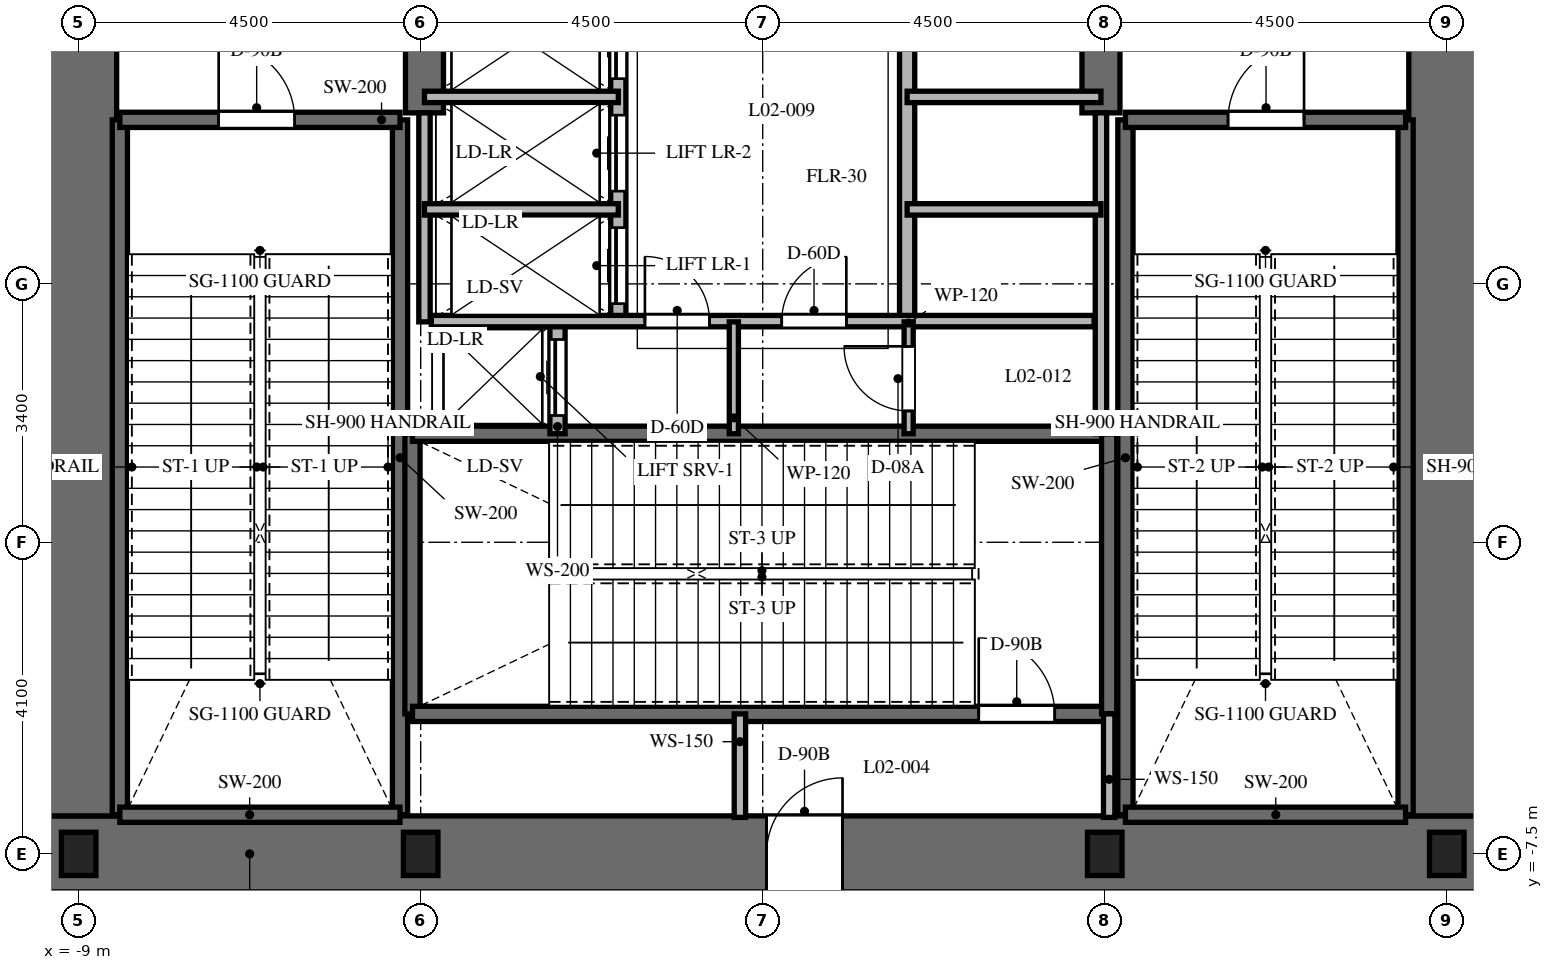
"""IFC4 building model, lengths in metres.
Left out: names, types, materials, properties, quantities, classifications, styles, units other than length and angle.
Written with IfcOpenShell. Run it as: python <this file> out.ifc"""

import sys

from ifc_helpers import new_model, si_unit, direction, frame, frame_2d, origin, origin_2d, place, context, subcontext, project, spatial, rectangle, i_section, extrude, element, fill, save


model = new_model("IFC4")
c1 = context("Model", 3, precision=1e-05, world=origin(), true_north=direction((0.0, 1.0)))
c2 = subcontext(c1, "Body", "Model", "MODEL_VIEW")
j1 = project(units=[si_unit("LENGTHUNIT", "METRE"), si_unit("PLANEANGLEUNIT", "RADIAN")], contexts=[c1])
p1 = place(None, origin())
s1 = spatial("IfcSite", under=j1, at=p1, CompositionType="ELEMENT")
p2 = place(p1, origin())
s2 = spatial("IfcBuilding", under=s1, at=p2, CompositionType="ELEMENT")
p3 = place(p2, frame((0.0, 0.0, 11.4)))
s3 = spatial("IfcBuildingStorey", under=s2, at=p3, CompositionType="ELEMENT", Elevation=11.4)
p4 = place(p3, frame((-9.5, -7.5, 0.0), z_axis=(0.0, 0.0, 1.0), x_axis=(1.0, 0.0, 0.0)))
e1 = element("IfcWall", 1, at=p4, inside=s3, PredefinedType="SHEAR", context=c2, shape_type="SweptSolid", body=[
    extrude(rectangle(XDim=19.0, YDim=1.0, at=frame_2d((9.5, 0.0))), origin(), (0.0, 0.0, 1.0), 7.2),
])
p5 = place(p4, frame((9.55, 0.0, 0.0)))
e2 = element("IfcOpeningElement", 2, at=p5, cuts=e1, PredefinedType="OPENING", context=c2, shape_type="SweptSolid", body=[
    extrude(rectangle(XDim=1.0, YDim=2.15, at=frame_2d((0.5, 1.075))), frame((0.0, 0.51, 0.0), z_axis=(0.0, -1.0, 0.0), x_axis=(1.0, 0.0, 0.0)), (0.0, 0.0, 1.0), 1.02),
])
p6 = place(p3, frame((-9.0, -7.0, 0.0), z_axis=(0.0, 0.0, 1.0), x_axis=(0.0, 1.0, 0.0)))
e3 = element("IfcWall", 3, at=p6, inside=s3, PredefinedType="SHEAR", context=c2, shape_type="SweptSolid", body=[
    extrude(rectangle(XDim=14.0, YDim=1.0, at=frame_2d((7.0, 0.0))), origin(), (0.0, 0.0, 1.0), 7.2),
])
p7 = place(p6, frame((10.125, 0.0, 0.0)))
e4 = element("IfcOpeningElement", 4, at=p7, cuts=e3, PredefinedType="OPENING", context=c2, shape_type="SweptSolid", body=[
    extrude(rectangle(XDim=1.05, YDim=2.15, at=frame_2d((0.525, 1.075))), frame((0.0, 0.51, 0.0), z_axis=(0.0, -1.0, 0.0), x_axis=(1.0, 0.0, 0.0)), (0.0, 0.0, 1.0), 1.02),
])
p8 = place(p3, frame((9.0, -7.0, 0.0), z_axis=(0.0, 0.0, 1.0), x_axis=(0.0, 1.0, 0.0)))
e5 = element("IfcWall", 5, at=p8, inside=s3, PredefinedType="SHEAR", context=c2, shape_type="SweptSolid", body=[
    extrude(rectangle(XDim=14.0, YDim=1.0, at=frame_2d((7.0, 0.0))), origin(), (0.0, 0.0, 1.0), 7.2),
])
p9 = place(p8, frame((10.125, 0.0, 0.0)))
e6 = element("IfcOpeningElement", 6, at=p9, cuts=e5, PredefinedType="OPENING", context=c2, shape_type="SweptSolid", body=[
    extrude(rectangle(XDim=1.05, YDim=2.15, at=frame_2d((0.525, 1.075))), frame((0.0, 0.51, 0.0), z_axis=(0.0, -1.0, 0.0), x_axis=(1.0, 0.0, 0.0)), (0.0, 0.0, 1.0), 1.02),
])
for number, where, z_axis, x_axis in (
    (7, (-4.45, 2.25, 0.0), (0.0, 0.0, 1.0), (0.0, 1.0, 0.0)),
    (8, (4.45, 2.25, 0.0), (0.0, 0.0, 1.0), (0.0, 1.0, 0.0)),
):
    element("IfcWall", number, at=place(p3, frame(where, z_axis=z_axis, x_axis=x_axis)), inside=s3, PredefinedType="SHEAR", context=c2, shape_type="SweptSolid", body=[
        extrude(rectangle(XDim=4.75, YDim=0.5, at=frame_2d((2.375, 0.0))), origin(), (0.0, 0.0, 1.0), 7.2),
    ])
for number, where, z_axis, x_axis in (
    (9, (-8.458, -6.985, 0.0), (0.0, 0.0, 1.0), (0.0, 1.0, 0.0)),
    (10, (-4.772, -6.985, 0.0), (0.0, 0.0, 1.0), (0.0, 1.0, 0.0)),
):
    element("IfcWall", number, at=place(p3, frame(where, z_axis=z_axis, x_axis=x_axis)), inside=s3, PredefinedType="SHEAR", context=c2, shape_type="SweptSolid", body=[
        extrude(rectangle(XDim=9.143, YDim=0.2, at=frame_2d((4.572, 0.0))), origin(), (0.0, 0.0, 1.0), 7.2),
    ])
p10 = place(p3, frame((-8.458, -6.985, 0.0), z_axis=(0.0, 0.0, 1.0), x_axis=(1.0, 0.0, 0.0)))
e11 = element("IfcWall", 11, at=p10, inside=s3, PredefinedType="SHEAR", context=c2, shape_type="SweptSolid", body=[
    extrude(rectangle(XDim=3.686, YDim=0.2, at=frame_2d((1.843, 0.0))), origin(), (0.0, 0.0, 1.0), 7.2),
])
p11 = place(p3, frame((-8.458, 2.158, 0.0), z_axis=(0.0, 0.0, 1.0), x_axis=(1.0, 0.0, 0.0)))
e12 = element("IfcWall", 12, at=p11, inside=s3, PredefinedType="SHEAR", context=c2, shape_type="SweptSolid", body=[
    extrude(rectangle(XDim=3.686, YDim=0.2, at=frame_2d((1.843, 0.0))), origin(), (0.0, 0.0, 1.0), 7.2),
])
p12 = place(p11, frame((1.3, 0.0, 0.0)))
e13 = element("IfcOpeningElement", 13, at=p12, cuts=e12, PredefinedType="OPENING", context=c2, shape_type="SweptSolid", body=[
    extrude(rectangle(XDim=1.0, YDim=2.15, at=frame_2d((0.5, 1.075))), frame((0.0, 0.11, 0.0), z_axis=(0.0, -1.0, 0.0), x_axis=(1.0, 0.0, 0.0)), (0.0, 0.0, 1.0), 0.22),
])
for number, where, z_axis, x_axis in (
    (14, (4.772, -6.985, 0.0), (0.0, 0.0, 1.0), (0.0, 1.0, 0.0)),
    (15, (8.458, -6.985, 0.0), (0.0, 0.0, 1.0), (0.0, 1.0, 0.0)),
):
    element("IfcWall", number, at=place(p3, frame(where, z_axis=z_axis, x_axis=x_axis)), inside=s3, PredefinedType="SHEAR", context=c2, shape_type="SweptSolid", body=[
        extrude(rectangle(XDim=9.143, YDim=0.2, at=frame_2d((4.572, 0.0))), origin(), (0.0, 0.0, 1.0), 7.2),
    ])
p13 = place(p3, frame((4.772, -6.985, 0.0), z_axis=(0.0, 0.0, 1.0), x_axis=(1.0, 0.0, 0.0)))
e16 = element("IfcWall", 16, at=p13, inside=s3, PredefinedType="SHEAR", context=c2, shape_type="SweptSolid", body=[
    extrude(rectangle(XDim=3.686, YDim=0.2, at=frame_2d((1.843, 0.0))), origin(), (0.0, 0.0, 1.0), 7.2),
])
p14 = place(p3, frame((4.772, 2.158, 0.0), z_axis=(0.0, 0.0, 1.0), x_axis=(1.0, 0.0, 0.0)))
e17 = element("IfcWall", 17, at=p14, inside=s3, PredefinedType="SHEAR", context=c2, shape_type="SweptSolid", body=[
    extrude(rectangle(XDim=3.686, YDim=0.2, at=frame_2d((1.843, 0.0))), origin(), (0.0, 0.0, 1.0), 7.2),
])
p15 = place(p14, frame((1.35, 0.0, 0.0)))
e18 = element("IfcOpeningElement", 18, at=p15, cuts=e17, PredefinedType="OPENING", context=c2, shape_type="SweptSolid", body=[
    extrude(rectangle(XDim=1.0, YDim=2.15, at=frame_2d((0.5, 1.075))), frame((0.0, 0.11, 0.0), z_axis=(0.0, -1.0, 0.0), x_axis=(1.0, 0.0, 0.0)), (0.0, 0.0, 1.0), 0.22),
])
p16 = place(p3, frame((-4.608, -5.658, 0.0), z_axis=(0.0, 0.0, 1.0), x_axis=(0.0, 1.0, 0.0)))
e19 = element("IfcWall", 19, at=p16, inside=s3, PredefinedType="SHEAR", context=c2, shape_type="SweptSolid", body=[
    extrude(rectangle(XDim=3.686, YDim=0.2, at=frame_2d((1.843, 0.0))), origin(), (0.0, 0.0, 1.0), 7.2),
])
p17 = place(p3, frame((-4.608, -5.658, 0.0), z_axis=(0.0, 0.0, 1.0), x_axis=(1.0, 0.0, 0.0)))
e20 = element("IfcWall", 20, at=p17, inside=s3, PredefinedType="SHEAR", context=c2, shape_type="SweptSolid", body=[
    extrude(rectangle(XDim=9.166, YDim=0.2, at=frame_2d((4.583, 0.0))), origin(), (0.0, 0.0, 1.0), 7.2),
])
p18 = place(p17, frame((7.45, 0.0, 0.0)))
e21 = element("IfcOpeningElement", 21, at=p18, cuts=e20, PredefinedType="OPENING", context=c2, shape_type="SweptSolid", body=[
    extrude(rectangle(XDim=1.0, YDim=2.15, at=frame_2d((0.5, 1.075))), frame((0.0, 0.11, 0.0), z_axis=(0.0, -1.0, 0.0), x_axis=(1.0, 0.0, 0.0)), (0.0, 0.0, 1.0), 0.22),
])
p19 = place(p3, frame((-4.608, -1.972, 0.0), z_axis=(0.0, 0.0, 1.0), x_axis=(1.0, 0.0, 0.0)))
e22 = element("IfcWall", 22, at=p19, inside=s3, PredefinedType="SHEAR", context=c2, shape_type="SweptSolid", body=[
    extrude(rectangle(XDim=9.166, YDim=0.2, at=frame_2d((4.583, 0.0))), origin(), (0.0, 0.0, 1.0), 7.2),
])
p20 = place(p3, frame((4.558, -5.658, 0.0), z_axis=(0.0, 0.0, 1.0), x_axis=(0.0, 1.0, 0.0)))
e23 = element("IfcWall", 23, at=p20, inside=s3, PredefinedType="SHEAR", context=c2, shape_type="SweptSolid", body=[
    extrude(rectangle(XDim=3.686, YDim=0.2, at=frame_2d((1.843, 0.0))), origin(), (0.0, 0.0, 1.0), 7.2),
])
for number, where, z_axis, x_axis in (
    (24, (-9.0, -7.5, 0.0), (0.0, 0.0, 1.0), (1.0, 0.0, 0.0)),
    (25, (-4.5, -7.5, 0.0), (0.0, 0.0, 1.0), (1.0, 0.0, 0.0)),
    (26, (4.5, -7.5, 0.0), (0.0, 0.0, 1.0), (1.0, 0.0, 0.0)),
    (27, (9.0, -7.5, 0.0), (0.0, 0.0, 1.0), (1.0, 0.0, 0.0)),
):
    element("IfcColumn", number, at=place(p3, frame(where, z_axis=z_axis, x_axis=x_axis)), inside=s3, PredefinedType="COLUMN", context=c2, shape_type="SweptSolid", body=[
        extrude(i_section(OverallWidth=0.454, OverallDepth=0.569, WebThickness=0.078, FlangeThickness=0.125, at=origin_2d()), origin(), (0.0, 0.0, 1.0), 7.2),
    ])
for number, where, z_axis, x_axis in (
    (28, (-0.3, -7.02, 0.0), (0.0, 0.0, 1.0), (0.0, 1.0, 0.0)),
    (29, (4.558, -7.02, 0.0), (0.0, 0.0, 1.0), (0.0, 1.0, 0.0)),
):
    element("IfcWall", number, at=place(p3, frame(where, z_axis=z_axis, x_axis=x_axis)), inside=s3, PredefinedType="PARTITIONING", context=c2, shape_type="SweptSolid", body=[
        extrude(rectangle(XDim=1.362, YDim=0.15, at=frame_2d((0.681, 0.0))), origin(), (0.0, 0.0, 1.0), 6.88),
    ])
p21 = place(p3, frame((-2.7, -1.972, 0.0), z_axis=(0.0, 0.0, 1.0), x_axis=(0.0, 1.0, 0.0)))
e30 = element("IfcWall", 30, at=p21, inside=s3, PredefinedType="PARTITIONING", context=c2, shape_type="SweptSolid", body=[
    extrude(rectangle(XDim=1.472, YDim=0.2, at=frame_2d((0.736, 0.0))), origin(), (0.0, 0.0, 1.0), 6.88),
])
p22 = place(p21, frame((0.24, 0.0, 0.0)))
e31 = element("IfcOpeningElement", 31, at=p22, cuts=e30, PredefinedType="OPENING", context=c2, shape_type="SweptSolid", body=[
    extrude(rectangle(XDim=1.0, YDim=2.2, at=frame_2d((0.5, 1.1))), frame((0.0, 0.11, 0.0), z_axis=(0.0, -1.0, 0.0), x_axis=(1.0, 0.0, 0.0)), (0.0, 0.0, 1.0), 0.22),
])
p23 = place(p3, frame((-4.45, -0.5, 0.0), z_axis=(0.0, 0.0, 1.0), x_axis=(0.0, 1.0, 0.0)))
e32 = element("IfcWall", 32, at=p23, inside=s3, PredefinedType="PARTITIONING", context=c2, shape_type="SweptSolid", body=[
    extrude(rectangle(XDim=2.75, YDim=0.15, at=frame_2d((1.375, 0.0))), origin(), (0.0, 0.0, 1.0), 6.88),
])
p24 = place(p3, frame((4.45, -1.972, 0.0), z_axis=(0.0, 0.0, 1.0), x_axis=(0.0, 1.0, 0.0)))
e33 = element("IfcWall", 33, at=p24, inside=s3, PredefinedType="PARTITIONING", context=c2, shape_type="SweptSolid", body=[
    extrude(rectangle(XDim=4.222, YDim=0.15, at=frame_2d((2.111, 0.0))), origin(), (0.0, 0.0, 1.0), 6.88),
])
p25 = place(p3, frame((-1.9, -0.5, 0.0), z_axis=(0.0, 0.0, 1.0), x_axis=(0.0, 1.0, 0.0)))
e34 = element("IfcWall", 34, at=p25, inside=s3, PredefinedType="PARTITIONING", context=c2, shape_type="SweptSolid", body=[
    extrude(rectangle(XDim=4.44, YDim=0.2, at=frame_2d((2.22, 0.0))), origin(), (0.0, 0.0, 1.0), 6.88),
])
p26 = place(p25, frame((0.24, 0.0, 0.0)))
e35 = element("IfcOpeningElement", 35, at=p26, cuts=e34, PredefinedType="OPENING", context=c2, shape_type="SweptSolid", body=[
    extrude(rectangle(XDim=1.0, YDim=2.2, at=frame_2d((0.5, 1.1))), frame((0.0, 0.11, 0.0), z_axis=(0.0, -1.0, 0.0), x_axis=(1.0, 0.0, 0.0)), (0.0, 0.0, 1.0), 0.22),
])
p27 = place(p25, frame((1.72, 0.0, 0.0)))
e36 = element("IfcOpeningElement", 36, at=p27, cuts=e34, PredefinedType="OPENING", context=c2, shape_type="SweptSolid", body=[
    extrude(rectangle(XDim=1.0, YDim=2.2, at=frame_2d((0.5, 1.1))), frame((0.0, 0.11, 0.0), z_axis=(0.0, -1.0, 0.0), x_axis=(1.0, 0.0, 0.0)), (0.0, 0.0, 1.0), 0.22),
])
p28 = place(p25, frame((3.2, 0.0, 0.0)))
e37 = element("IfcOpeningElement", 37, at=p28, cuts=e34, PredefinedType="OPENING", context=c2, shape_type="SweptSolid", body=[
    extrude(rectangle(XDim=1.0, YDim=2.2, at=frame_2d((0.5, 1.1))), frame((0.0, 0.11, 0.0), z_axis=(0.0, -1.0, 0.0), x_axis=(1.0, 0.0, 0.0)), (0.0, 0.0, 1.0), 0.22),
])
for number, where, z_axis, x_axis in (
    (38, (-4.45, 0.98, 0.0), (0.0, 0.0, 1.0), (1.0, 0.0, 0.0)),
    (39, (-4.45, 2.46, 0.0), (0.0, 0.0, 1.0), (1.0, 0.0, 0.0)),
):
    element("IfcWall", number, at=place(p3, frame(where, z_axis=z_axis, x_axis=x_axis)), inside=s3, PredefinedType="PARTITIONING", context=c2, shape_type="SweptSolid", body=[
        extrude(rectangle(XDim=2.55, YDim=0.15, at=frame_2d((1.275, 0.0))), origin(), (0.0, 0.0, 1.0), 6.88),
    ])
p29 = place(p3, frame((1.9, -0.5, 0.0), z_axis=(0.0, 0.0, 1.0), x_axis=(0.0, 1.0, 0.0)))
e40 = element("IfcWall", 40, at=p29, inside=s3, PredefinedType="PARTITIONING", context=c2, shape_type="SweptSolid", body=[
    extrude(rectangle(XDim=4.44, YDim=0.2, at=frame_2d((2.22, 0.0))), origin(), (0.0, 0.0, 1.0), 6.88),
])
for number, where, z_axis, x_axis in (
    (41, (1.9, 0.98, 0.0), (0.0, 0.0, 1.0), (1.0, 0.0, 0.0)),
    (42, (1.9, 2.46, 0.0), (0.0, 0.0, 1.0), (1.0, 0.0, 0.0)),
):
    element("IfcWall", number, at=place(p3, frame(where, z_axis=z_axis, x_axis=x_axis)), inside=s3, PredefinedType="PARTITIONING", context=c2, shape_type="SweptSolid", body=[
        extrude(rectangle(XDim=2.55, YDim=0.15, at=frame_2d((1.275, 0.0))), origin(), (0.0, 0.0, 1.0), 6.88),
    ])
p30 = place(p3, frame((-4.36, -0.49, 0.0), z_axis=(0.0, 0.0, 1.0), x_axis=(1.0, 0.0, 0.0)))
e43 = element("IfcWall", 43, at=p30, inside=s3, PredefinedType="PARTITIONING", context=c2, shape_type="SweptSolid", body=[
    extrude(rectangle(XDim=8.72, YDim=0.15, at=frame_2d((4.36, 0.0))), origin(), (0.0, 0.0, 1.0), 6.88),
])
p31 = place(p30, frame((2.81, 0.0, 0.0)))
e44 = element("IfcOpeningElement", 44, at=p31, cuts=e43, PredefinedType="OPENING", context=c2, shape_type="SweptSolid", body=[
    extrude(rectangle(XDim=0.85, YDim=2.03, at=frame_2d((0.425, 1.015))), frame((0.0, 0.085, 0.0), z_axis=(0.0, -1.0, 0.0), x_axis=(1.0, 0.0, 0.0)), (0.0, 0.0, 1.0), 0.17),
])
p32 = place(p30, frame((4.61, 0.0, 0.0)))
e45 = element("IfcOpeningElement", 45, at=p32, cuts=e43, PredefinedType="OPENING", context=c2, shape_type="SweptSolid", body=[
    extrude(rectangle(XDim=0.85, YDim=2.03, at=frame_2d((0.425, 1.015))), frame((0.0, 0.085, 0.0), z_axis=(0.0, -1.0, 0.0), x_axis=(1.0, 0.0, 0.0)), (0.0, 0.0, 1.0), 0.17),
])
p33 = place(p3, frame((-0.38, -1.972, 0.0), z_axis=(0.0, 0.0, 1.0), x_axis=(0.0, 1.0, 0.0)))
e46 = element("IfcWall", 46, at=p33, inside=s3, PredefinedType="PARTITIONING", context=c2, shape_type="SweptSolid", body=[
    extrude(rectangle(XDim=1.472, YDim=0.12, at=frame_2d((0.736, 0.0))), origin(), (0.0, 0.0, 1.0), 6.88),
])
p34 = place(p3, frame((1.92, -1.972, 0.0), z_axis=(0.0, 0.0, 1.0), x_axis=(0.0, 1.0, 0.0)))
e47 = element("IfcWall", 47, at=p34, inside=s3, PredefinedType="PARTITIONING", context=c2, shape_type="SweptSolid", body=[
    extrude(rectangle(XDim=1.472, YDim=0.12, at=frame_2d((0.736, 0.0))), origin(), (0.0, 0.0, 1.0), 6.88),
])
p35 = place(p34, frame((0.3, 0.0, 0.0)))
e48 = element("IfcOpeningElement", 48, at=p35, cuts=e47, PredefinedType="OPENING", context=c2, shape_type="SweptSolid", body=[
    extrude(rectangle(XDim=0.85, YDim=2.03, at=frame_2d((0.425, 1.015))), frame((0.0, 0.07, 0.0), z_axis=(0.0, -1.0, 0.0), x_axis=(1.0, 0.0, 0.0)), (0.0, 0.0, 1.0), 0.14),
])
p36 = place(p12, origin())
e49 = element("IfcDoor", 49, at=p36, inside=s3, OperationType="SINGLE_SWING_LEFT", PredefinedType="DOOR", context=c2, shape_type="SweptSolid", body=[
    extrude(rectangle(XDim=1.0, YDim=2.15, at=frame_2d((0.5, 1.075))), frame((0.0, 0.025, 0.0), z_axis=(0.0, -1.0, 0.0), x_axis=(1.0, 0.0, 0.0)), (0.0, 0.0, 1.0), 0.05),
])
fill(e13, e49)
p37 = place(p15, origin())
e50 = element("IfcDoor", 50, at=p37, inside=s3, OperationType="SINGLE_SWING_RIGHT", PredefinedType="DOOR", context=c2, shape_type="SweptSolid", body=[
    extrude(rectangle(XDim=1.0, YDim=2.15, at=frame_2d((0.5, 1.075))), frame((0.0, 0.025, 0.0), z_axis=(0.0, -1.0, 0.0), x_axis=(1.0, 0.0, 0.0)), (0.0, 0.0, 1.0), 0.05),
])
fill(e18, e50)
p38 = place(p18, origin())
e51 = element("IfcDoor", 51, at=p38, inside=s3, OperationType="SINGLE_SWING_LEFT", PredefinedType="DOOR", context=c2, shape_type="SweptSolid", body=[
    extrude(rectangle(XDim=1.0, YDim=2.15, at=frame_2d((0.5, 1.075))), frame((0.0, 0.025, 0.0), z_axis=(0.0, -1.0, 0.0), x_axis=(1.0, 0.0, 0.0)), (0.0, 0.0, 1.0), 0.05),
])
fill(e21, e51)
p39 = place(p5, origin())
e52 = element("IfcDoor", 52, at=p39, inside=s3, OperationType="SINGLE_SWING_RIGHT", PredefinedType="DOOR", context=c2, shape_type="SweptSolid", body=[
    extrude(rectangle(XDim=1.0, YDim=2.15, at=frame_2d((0.5, 1.075))), frame((0.0, 0.025, 0.0), z_axis=(0.0, -1.0, 0.0), x_axis=(1.0, 0.0, 0.0)), (0.0, 0.0, 1.0), 0.05),
])
fill(e2, e52)
p40 = place(p22, origin())
e53 = element("IfcDoor", 53, at=p40, inside=s3, OperationType="SLIDING_TO_LEFT", PredefinedType="DOOR", context=c2, shape_type="SweptSolid", body=[
    extrude(rectangle(XDim=1.0, YDim=2.2, at=frame_2d((0.5, 1.1))), frame((0.0, 0.025, 0.0), z_axis=(0.0, -1.0, 0.0), x_axis=(1.0, 0.0, 0.0)), (0.0, 0.0, 1.0), 0.05),
])
fill(e31, e53)
p41 = place(p26, origin())
e54 = element("IfcDoor", 54, at=p41, inside=s3, OperationType="SLIDING_TO_LEFT", PredefinedType="DOOR", context=c2, shape_type="SweptSolid", body=[
    extrude(rectangle(XDim=1.0, YDim=2.2, at=frame_2d((0.5, 1.1))), frame((0.0, 0.025, 0.0), z_axis=(0.0, -1.0, 0.0), x_axis=(1.0, 0.0, 0.0)), (0.0, 0.0, 1.0), 0.05),
])
fill(e35, e54)
p42 = place(p27, origin())
e55 = element("IfcDoor", 55, at=p42, inside=s3, OperationType="SLIDING_TO_LEFT", PredefinedType="DOOR", context=c2, shape_type="SweptSolid", body=[
    extrude(rectangle(XDim=1.0, YDim=2.2, at=frame_2d((0.5, 1.1))), frame((0.0, 0.025, 0.0), z_axis=(0.0, -1.0, 0.0), x_axis=(1.0, 0.0, 0.0)), (0.0, 0.0, 1.0), 0.05),
])
fill(e36, e55)
p43 = place(p28, origin())
e56 = element("IfcDoor", 56, at=p43, inside=s3, OperationType="SLIDING_TO_LEFT", PredefinedType="DOOR", context=c2, shape_type="SweptSolid", body=[
    extrude(rectangle(XDim=1.0, YDim=2.2, at=frame_2d((0.5, 1.1))), frame((0.0, 0.025, 0.0), z_axis=(0.0, -1.0, 0.0), x_axis=(1.0, 0.0, 0.0)), (0.0, 0.0, 1.0), 0.05),
])
fill(e37, e56)
p44 = place(p31, origin())
e57 = element("IfcDoor", 57, at=p44, inside=s3, OperationType="SINGLE_SWING_LEFT", PredefinedType="DOOR", context=c2, shape_type="SweptSolid", body=[
    extrude(rectangle(XDim=0.85, YDim=2.03, at=frame_2d((0.425, 1.015))), frame((0.0, 0.025, 0.0), z_axis=(0.0, -1.0, 0.0), x_axis=(1.0, 0.0, 0.0)), (0.0, 0.0, 1.0), 0.05),
])
fill(e44, e57)
p45 = place(p32, origin())
e58 = element("IfcDoor", 58, at=p45, inside=s3, OperationType="SINGLE_SWING_RIGHT", PredefinedType="DOOR", context=c2, shape_type="SweptSolid", body=[
    extrude(rectangle(XDim=0.85, YDim=2.03, at=frame_2d((0.425, 1.015))), frame((0.0, 0.025, 0.0), z_axis=(0.0, -1.0, 0.0), x_axis=(1.0, 0.0, 0.0)), (0.0, 0.0, 1.0), 0.05),
])
fill(e45, e58)
p46 = place(p35, origin())
e59 = element("IfcDoor", 59, at=p46, inside=s3, OperationType="SINGLE_SWING_RIGHT", PredefinedType="DOOR", context=c2, shape_type="SweptSolid", body=[
    extrude(rectangle(XDim=0.85, YDim=2.03, at=frame_2d((0.425, 1.015))), frame((0.0, 0.025, 0.0), z_axis=(0.0, -1.0, 0.0), x_axis=(1.0, 0.0, 0.0)), (0.0, 0.0, 1.0), 0.05),
])
fill(e48, e59)
save(model, sys.argv[1])
